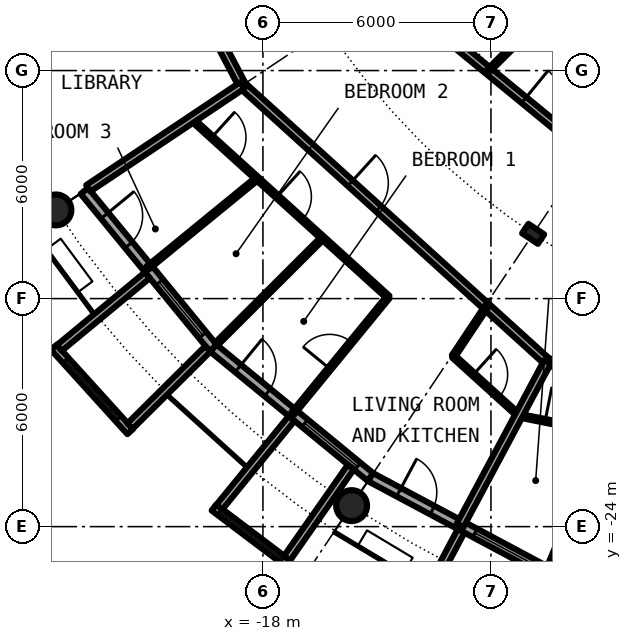
"""IFC4 building model, lengths in metres.
Left out: names, types, materials, properties, quantities, classifications, styles, units other than length and angle.
Written with IfcOpenShell. Run it as: python <this file> out.ifc"""

import sys

from ifc_helpers import new_model, si_unit, direction, frame, frame_2d, origin, origin_2d, place, context, subcontext, project, spatial, rectangle, circle, hollow_circle, i_section, extrude, element, fill, save


model = new_model("IFC4")
c1 = context("Model", 3, precision=1e-05, world=origin(), true_north=direction((0.0, 1.0)))
c2 = subcontext(c1, "Body", "Model", "MODEL_VIEW")
j1 = project(units=[si_unit("LENGTHUNIT", "METRE"), si_unit("PLANEANGLEUNIT", "RADIAN")], contexts=[c1])
p1 = place(None, origin())
s1 = spatial("IfcSite", under=j1, at=p1, CompositionType="ELEMENT")
p2 = place(p1, origin())
s2 = spatial("IfcBuilding", under=s1, at=p2, CompositionType="ELEMENT")
p3 = place(p2, frame((0.0, 0.0, 154.35)))
s3 = spatial("IfcBuildingStorey", under=s2, at=p3, CompositionType="ELEMENT", Elevation=154.35)
for number, where, z_axis, x_axis in (
    (1, (-23.448, -15.667, 0.0), (0.0, 0.0, 1.0), (1.0, 0.0, 0.0)),
    (2, (-15.667, -23.448, 0.0), (0.0, 0.0, 1.0), (1.0, 0.0, 0.0)),
):
    element("IfcColumn", number, at=place(p3, frame(where, z_axis=z_axis, x_axis=x_axis)), inside=s3, PredefinedType="COLUMN", context=c2, shape_type="SweptSolid", body=[
        extrude(hollow_circle(Radius=0.406, WallThickness=0.04, at=origin_2d()), origin(), (0.0, 0.0, 1.0), 3.05),
    ])
p4 = place(p3, frame((-10.889, -16.297, 0.0), z_axis=(0.0, 0.0, 1.0), x_axis=(-0.55557023302, -0.831469612303, 0.0)))
e3 = element("IfcColumn", 3, at=p4, inside=s3, PredefinedType="COLUMN", context=c2, shape_type="SweptSolid", body=[
    extrude(i_section(OverallWidth=0.3, OverallDepth=0.5, WebThickness=0.014, FlangeThickness=0.028, FilletRadius=0.027, at=origin_2d()), origin(), (0.0, 0.0, 1.0), 3.05),
])
p5 = place(p3, frame((-22.699, -15.167, 0.0), z_axis=(0.0, 0.0, 1.0), x_axis=(0.634382322723, -0.773019449054, 0.0)))
e4 = element("IfcWall", 4, at=p5, inside=s3, PredefinedType="SOLIDWALL", context=c2, shape_type="SweptSolid", body=[
    extrude(rectangle(XDim=5.352, YDim=0.25, at=frame_2d((2.676, 0.0))), origin(), (0.0, 0.0, 1.0), 2.7),
])
p6 = place(p5, frame((0.841, 0.0, 0.0)))
e5 = element("IfcOpeningElement", 5, at=p6, cuts=e4, PredefinedType="OPENING", context=c2, shape_type="SweptSolid", body=[
    extrude(rectangle(XDim=1.0, YDim=2.2, at=frame_2d((0.5, 1.1))), frame((0.0, 0.135, 0.0), z_axis=(0.0, -1.0, 0.0), x_axis=(1.0, 0.0, 0.0)), (0.0, 0.0, 1.0), 0.27),
])
p7 = place(p5, frame((3.111, 0.0, 0.3)))
e6 = element("IfcOpeningElement", 6, at=p7, cuts=e4, PredefinedType="OPENING", context=c2, shape_type="SweptSolid", body=[
    extrude(rectangle(XDim=1.8, YDim=2.1, at=frame_2d((0.9, 1.05))), frame((0.0, 0.135, 0.0), z_axis=(0.0, -1.0, 0.0), x_axis=(1.0, 0.0, 0.0)), (0.0, 0.0, 1.0), 0.27),
])
p8 = place(p3, frame((-23.503, -19.282, -0.03), z_axis=(0.0, 0.0, 1.0), x_axis=(0.671506829416, -0.740998365753, 0.0)))
e7 = element("IfcWall", 7, at=p8, inside=s3, PredefinedType="SOLIDWALL", context=c2, shape_type="SweptSolid", body=[
    extrude(rectangle(XDim=2.993, YDim=0.2, at=frame_2d((1.497, 0.0))), origin(), (0.0, 0.0, 1.0), 2.73),
])
p9 = place(p8, frame((0.457, 0.0, 0.33)))
e8 = element("IfcOpeningElement", 8, at=p9, cuts=e7, PredefinedType="OPENING", context=c2, shape_type="SweptSolid", body=[
    extrude(circle(Radius=1.04, at=frame_2d((1.04, 1.04))), frame((0.0, 0.11, 0.0), z_axis=(0.0, -1.0, 0.0), x_axis=(1.0, 0.0, 0.0)), (0.0, 0.0, 1.0), 0.22),
])
p10 = place(p3, frame((-21.041, -17.384, -0.03), z_axis=(0.0, 0.0, 1.0), x_axis=(-0.770784861449, -0.63709551667, 0.0)))
e9 = element("IfcWall", 9, at=p10, inside=s3, PredefinedType="SOLIDWALL", context=c2, shape_type="SweptSolid", body=[
    extrude(rectangle(XDim=3.006, YDim=0.2, at=frame_2d((1.503, 0.0))), origin(), (0.0, 0.0, 1.0), 2.73),
])
p11 = place(p3, frame((-19.45, -19.323, -0.03), z_axis=(0.0, 0.0, 1.0), x_axis=(-0.709727076896, -0.704476739375, 0.0)))
e10 = element("IfcWall", 10, at=p11, inside=s3, PredefinedType="SOLIDWALL", context=c2, shape_type="SweptSolid", body=[
    extrude(rectangle(XDim=2.883, YDim=0.2, at=frame_2d((1.441, 0.0))), origin(), (0.0, 0.0, 1.0), 2.73),
])
p12 = place(p3, frame((-19.304, -19.304, 0.0), z_axis=(0.0, 0.0, 1.0), x_axis=(0.773019449054, -0.634382322723, 0.0)))
e11 = element("IfcWall", 11, at=p12, inside=s3, PredefinedType="SOLIDWALL", context=c2, shape_type="SweptSolid", body=[
    extrude(rectangle(XDim=5.352, YDim=0.25, at=frame_2d((2.676, 0.0))), origin(), (0.0, 0.0, 1.0), 2.7),
])
p13 = place(p12, frame((0.841, 0.0, 0.0)))
e12 = element("IfcOpeningElement", 12, at=p13, cuts=e11, PredefinedType="OPENING", context=c2, shape_type="SweptSolid", body=[
    extrude(rectangle(XDim=1.0, YDim=2.2, at=frame_2d((0.5, 1.1))), frame((0.0, 0.135, 0.0), z_axis=(0.0, -1.0, 0.0), x_axis=(1.0, 0.0, 0.0)), (0.0, 0.0, 1.0), 0.27),
])
p14 = place(p12, frame((3.111, 0.0, 0.3)))
e13 = element("IfcOpeningElement", 13, at=p14, cuts=e11, PredefinedType="OPENING", context=c2, shape_type="SweptSolid", body=[
    extrude(rectangle(XDim=1.8, YDim=2.1, at=frame_2d((0.9, 1.05))), frame((0.0, 0.135, 0.0), z_axis=(0.0, -1.0, 0.0), x_axis=(1.0, 0.0, 0.0)), (0.0, 0.0, 1.0), 0.27),
])
p15 = place(p3, frame((-19.289, -23.497, -0.03), z_axis=(0.0, 0.0, 1.0), x_axis=(0.797887588059, -0.602806268067, 0.0)))
e14 = element("IfcWall", 14, at=p15, inside=s3, PredefinedType="SOLIDWALL", context=c2, shape_type="SweptSolid", body=[
    extrude(rectangle(XDim=2.447, YDim=0.2, at=frame_2d((1.223, 0.0))), origin(), (0.0, 0.0, 1.0), 2.73),
])
p16 = place(p15, frame((0.183, 0.0, 0.33)))
e15 = element("IfcOpeningElement", 15, at=p16, cuts=e14, PredefinedType="OPENING", context=c2, shape_type="SweptSolid", body=[
    extrude(circle(Radius=1.04, at=frame_2d((1.04, 1.04))), frame((0.0, 0.11, 0.0), z_axis=(0.0, -1.0, 0.0), x_axis=(1.0, 0.0, 0.0)), (0.0, 0.0, 1.0), 0.22),
])
p17 = place(p3, frame((-17.246, -21.155, -0.03), z_axis=(0.0, 0.0, 1.0), x_axis=(-0.631741648902, -0.775179004516, 0.0)))
e16 = element("IfcWall", 16, at=p17, inside=s3, PredefinedType="SOLIDWALL", context=c2, shape_type="SweptSolid", body=[
    extrude(rectangle(XDim=3.006, YDim=0.2, at=frame_2d((1.503, 0.0))), origin(), (0.0, 0.0, 1.0), 2.73),
])
p18 = place(p3, frame((-15.688, -22.433, -0.03), z_axis=(0.0, 0.0, 1.0), x_axis=(-0.573260687834, -0.819373043115, 0.0)))
e17 = element("IfcWall", 17, at=p18, inside=s3, PredefinedType="SOLIDWALL", context=c2, shape_type="SweptSolid", body=[
    extrude(rectangle(XDim=2.925, YDim=0.2, at=frame_2d((1.463, 0.0))), origin(), (0.0, 0.0, 1.0), 2.73),
])
p19 = place(p3, frame((-15.167, -22.699, 0.0), z_axis=(0.0, 0.0, 1.0), x_axis=(0.881915646801, -0.471407246368, 0.0)))
e18 = element("IfcWall", 18, at=p19, inside=s3, PredefinedType="SOLIDWALL", context=c2, shape_type="SweptSolid", body=[
    extrude(rectangle(XDim=5.352, YDim=0.25, at=frame_2d((2.676, 0.0))), origin(), (0.0, 0.0, 1.0), 2.7),
])
p20 = place(p19, frame((0.841, 0.0, 0.0)))
e19 = element("IfcOpeningElement", 19, at=p20, cuts=e18, PredefinedType="OPENING", context=c2, shape_type="SweptSolid", body=[
    extrude(rectangle(XDim=1.0, YDim=2.2, at=frame_2d((0.5, 1.1))), frame((0.0, 0.135, 0.0), z_axis=(0.0, -1.0, 0.0), x_axis=(1.0, 0.0, 0.0)), (0.0, 0.0, 1.0), 0.27),
])
p21 = place(p19, frame((3.111, 0.0, 0.3)))
e20 = element("IfcOpeningElement", 20, at=p21, cuts=e18, PredefinedType="OPENING", context=c2, shape_type="SweptSolid", body=[
    extrude(rectangle(XDim=1.8, YDim=2.1, at=frame_2d((0.9, 1.05))), frame((0.0, 0.135, 0.0), z_axis=(0.0, -1.0, 0.0), x_axis=(1.0, 0.0, 0.0)), (0.0, 0.0, 1.0), 0.27),
])
p22 = place(p3, frame((-12.787, -24.113, -0.03), z_axis=(0.0, 0.0, 1.0), x_axis=(-0.468365282436, -0.883534924159, 0.0)))
e21 = element("IfcWall", 21, at=p22, inside=s3, PredefinedType="SOLIDWALL", context=c2, shape_type="SweptSolid", body=[
    extrude(rectangle(XDim=3.006, YDim=0.2, at=frame_2d((1.503, 0.0))), origin(), (0.0, 0.0, 1.0), 2.73),
])
p23 = place(p3, frame((-19.869, -13.284, 0.0), z_axis=(0.0, 0.0, 1.0), x_axis=(0.741104058203, -0.67139018083, 0.0)))
e22 = element("IfcWall", 22, at=p23, inside=s3, PredefinedType="PARTITIONING", context=c2, shape_type="SweptSolid", body=[
    extrude(rectangle(XDim=6.969, YDim=0.1, at=frame_2d((3.484, 0.0))), origin(), (0.0, 0.0, 1.0), 2.7),
])
p24 = place(p23, frame((3.028, 0.0, 0.0)))
e23 = element("IfcOpeningElement", 23, at=p24, cuts=e22, PredefinedType="OPENING", context=c2, shape_type="SweptSolid", body=[
    extrude(rectangle(XDim=0.9, YDim=2.3, at=frame_2d((0.45, 1.15))), frame((0.0, 0.06, 0.0), z_axis=(0.0, -1.0, 0.0), x_axis=(1.0, 0.0, 0.0)), (0.0, 0.0, 1.0), 0.12),
])
p25 = place(p23, frame((0.705, 0.0, 0.0)))
e24 = element("IfcOpeningElement", 24, at=p25, cuts=e22, PredefinedType="OPENING", context=c2, shape_type="SweptSolid", body=[
    extrude(rectangle(XDim=0.9, YDim=2.3, at=frame_2d((0.45, 1.15))), frame((0.0, 0.06, 0.0), z_axis=(0.0, -1.0, 0.0), x_axis=(1.0, 0.0, 0.0)), (0.0, 0.0, 1.0), 0.12),
])
p26 = place(p3, frame((-12.988, -19.518, 0.0), z_axis=(0.0, 0.0, 1.0), x_axis=(0.741132356378, -0.671358942988, 0.0)))
e25 = element("IfcWall", 25, at=p26, inside=s3, PredefinedType="PARTITIONING", context=c2, shape_type="SweptSolid", body=[
    extrude(rectangle(XDim=2.323, YDim=0.1, at=frame_2d((1.162, 0.0))), origin(), (0.0, 0.0, 1.0), 2.7),
])
p27 = place(p26, frame((0.712, 0.0, 0.0)))
e26 = element("IfcOpeningElement", 26, at=p27, cuts=e25, PredefinedType="OPENING", context=c2, shape_type="SweptSolid", body=[
    extrude(rectangle(XDim=0.9, YDim=2.3, at=frame_2d((0.45, 1.15))), frame((0.0, 0.06, 0.0), z_axis=(0.0, -1.0, 0.0), x_axis=(1.0, 0.0, 0.0)), (0.0, 0.0, 1.0), 0.12),
])
p28 = place(p3, frame((-11.264, -21.08, 0.0), z_axis=(0.0, 0.0, 1.0), x_axis=(0.980795304313, -0.195039921651, 0.0)))
e27 = element("IfcWall", 27, at=p28, inside=s3, PredefinedType="PARTITIONING", context=c2, shape_type="SweptSolid", body=[
    extrude(rectangle(XDim=6.937, YDim=0.1, at=frame_2d((3.469, 0.0))), origin(), (0.0, 0.0, 1.0), 2.7),
])
p29 = place(p28, frame((3.016, 0.0, 0.0)))
e28 = element("IfcOpeningElement", 28, at=p29, cuts=e27, PredefinedType="OPENING", context=c2, shape_type="SweptSolid", body=[
    extrude(rectangle(XDim=0.9, YDim=2.3, at=frame_2d((0.45, 1.15))), frame((0.0, 0.06, 0.0), z_axis=(0.0, -1.0, 0.0), x_axis=(1.0, 0.0, 0.0)), (0.0, 0.0, 1.0), 0.12),
])
p30 = place(p28, frame((0.704, 0.0, 0.0)))
e29 = element("IfcOpeningElement", 29, at=p30, cuts=e27, PredefinedType="OPENING", context=c2, shape_type="SweptSolid", body=[
    extrude(rectangle(XDim=0.9, YDim=2.3, at=frame_2d((0.45, 1.15))), frame((0.0, 0.06, 0.0), z_axis=(0.0, -1.0, 0.0), x_axis=(1.0, 0.0, 0.0)), (0.0, 0.0, 1.0), 0.12),
])
p31 = place(p3, frame((-19.307, -10.935, 0.0), z_axis=(0.0, 0.0, 1.0), x_axis=(0.465605550524, -0.884992356646, 0.0)))
e30 = element("IfcWall", 30, at=p31, inside=s3, PredefinedType="PARTITIONING", context=c2, shape_type="SweptSolid", body=[
    extrude(rectangle(XDim=1.643, YDim=0.2, at=frame_2d((0.821, 0.0))), origin(), (0.0, 0.0, 1.0), 2.7),
])
p32 = place(p3, frame((-18.542, -12.389, 0.0), z_axis=(0.0, 0.0, 1.0), x_axis=(0.740979597636, -0.671527539188, 0.0)))
e31 = element("IfcWall", 31, at=p32, inside=s3, PredefinedType="PARTITIONING", context=c2, shape_type="SweptSolid", body=[
    extrude(rectangle(XDim=10.841, YDim=0.2, at=frame_2d((5.42, 0.0))), origin(), (0.0, 0.0, 1.0), 2.7),
])
p33 = place(p32, frame((3.835, 0.0, 0.0)))
e32 = element("IfcOpeningElement", 32, at=p33, cuts=e31, PredefinedType="OPENING", context=c2, shape_type="SweptSolid", body=[
    extrude(rectangle(XDim=1.0, YDim=2.3, at=frame_2d((0.5, 1.15))), frame((0.0, 0.11, 0.0), z_axis=(0.0, -1.0, 0.0), x_axis=(1.0, 0.0, 0.0)), (0.0, 0.0, 1.0), 0.22),
])
p34 = place(p3, frame((-10.512, -19.667, 0.0), z_axis=(0.0, 0.0, 1.0), x_axis=(0.980780341017, -0.195115152343, 0.0)))
e33 = element("IfcWall", 33, at=p34, inside=s3, PredefinedType="PARTITIONING", context=c2, shape_type="SweptSolid", body=[
    extrude(rectangle(XDim=12.947, YDim=0.2, at=frame_2d((6.473, 0.0))), origin(), (0.0, 0.0, 1.0), 2.7),
])
p35 = place(p34, frame((4.894, 0.0, 0.0)))
e34 = element("IfcOpeningElement", 34, at=p35, cuts=e33, PredefinedType="OPENING", context=c2, shape_type="SweptSolid", body=[
    extrude(rectangle(XDim=1.0, YDim=2.3, at=frame_2d((0.5, 1.15))), frame((0.0, 0.11, 0.0), z_axis=(0.0, -1.0, 0.0), x_axis=(1.0, 0.0, 0.0)), (0.0, 0.0, 1.0), 0.22),
])
p36 = place(p3, frame((-14.717, -9.834, 0.0), z_axis=(0.0, 0.0, 1.0), x_axis=(0.773034536097, -0.634363938131, 0.0)))
e35 = element("IfcWall", 35, at=p36, inside=s3, PredefinedType="PARTITIONING", context=c2, shape_type="SweptSolid", body=[
    extrude(rectangle(XDim=10.277, YDim=0.2, at=frame_2d((5.138, 0.0))), origin(), (0.0, 0.0, 1.0), 2.7),
])
p37 = place(p36, frame((4.638, 0.0, 0.0)))
e36 = element("IfcOpeningElement", 36, at=p37, cuts=e35, PredefinedType="OPENING", context=c2, shape_type="SweptSolid", body=[
    extrude(rectangle(XDim=1.0, YDim=2.3, at=frame_2d((0.5, 1.15))), frame((0.0, 0.11, 0.0), z_axis=(0.0, -1.0, 0.0), x_axis=(1.0, 0.0, 0.0)), (0.0, 0.0, 1.0), 0.22),
])
p38 = place(p3, frame((-22.595, -15.098, 0.0), z_axis=(0.0, 0.0, 1.0), x_axis=(0.831387096605, 0.55569370664, 0.0)))
e37 = element("IfcWall", 37, at=p38, inside=s3, PredefinedType="PARTITIONING", context=c2, shape_type="SweptSolid", body=[
    extrude(rectangle(XDim=4.875, YDim=0.2, at=frame_2d((2.438, 0.0))), origin(), (0.0, 0.0, 1.0), 2.7),
])
p39 = place(p3, frame((-21.04, -17.199, 0.0), z_axis=(0.0, 0.0, 1.0), x_axis=(0.774321581607, 0.63279229472, 0.0)))
e38 = element("IfcWall", 38, at=p39, inside=s3, PredefinedType="PARTITIONING", context=c2, shape_type="SweptSolid", body=[
    extrude(rectangle(XDim=3.731, YDim=0.1, at=frame_2d((1.866, 0.0))), origin(), (0.0, 0.0, 1.0), 2.7),
])
p40 = place(p3, frame((-19.231, -19.2, 0.0), z_axis=(0.0, 0.0, 1.0), x_axis=(0.707722727509, 0.706490297858, 0.0)))
e39 = element("IfcWall", 39, at=p40, inside=s3, PredefinedType="PARTITIONING", context=c2, shape_type="SweptSolid", body=[
    extrude(rectangle(XDim=3.962, YDim=0.1, at=frame_2d((1.981, 0.0))), origin(), (0.0, 0.0, 1.0), 2.7),
])
p41 = place(p3, frame((-17.216, -21.026, 0.0), z_axis=(0.0, 0.0, 1.0), x_axis=(0.633590098448, 0.773668913133, 0.0)))
e40 = element("IfcWall", 40, at=p41, inside=s3, PredefinedType="PARTITIONING", context=c2, shape_type="SweptSolid", body=[
    extrude(rectangle(XDim=3.962, YDim=0.1, at=frame_2d((1.981, 0.0))), origin(), (0.0, 0.0, 1.0), 2.7),
])
p42 = place(p41, frame((1.531, 0.0, 0.0)))
e41 = element("IfcOpeningElement", 41, at=p42, cuts=e40, PredefinedType="OPENING", context=c2, shape_type="SweptSolid", body=[
    extrude(rectangle(XDim=0.9, YDim=2.3, at=frame_2d((0.45, 1.15))), frame((0.0, 0.06, 0.0), z_axis=(0.0, -1.0, 0.0), x_axis=(1.0, 0.0, 0.0)), (0.0, 0.0, 1.0), 0.12),
])
p43 = place(p3, frame((-12.988, -19.518, 0.0), z_axis=(0.0, 0.0, 1.0), x_axis=(0.554125989098, 0.832432813028, 0.0)))
e42 = element("IfcWall", 42, at=p43, inside=s3, PredefinedType="PARTITIONING", context=c2, shape_type="SweptSolid", body=[
    extrude(rectangle(XDim=1.57, YDim=0.1, at=frame_2d((0.785, 0.0))), origin(), (0.0, 0.0, 1.0), 2.7),
])
p44 = place(p3, frame((-12.81, -23.966, 0.0), z_axis=(0.0, 0.0, 1.0), x_axis=(0.471427642527, 0.881904744211, 0.0)))
e43 = element("IfcWall", 43, at=p44, inside=s3, PredefinedType="PARTITIONING", context=c2, shape_type="SweptSolid", body=[
    extrude(rectangle(XDim=4.875, YDim=0.2, at=frame_2d((2.438, 0.0))), origin(), (0.0, 0.0, 1.0), 2.7),
])
p45 = place(p3, frame((-12.069, -12.007, 0.0), z_axis=(0.0, 0.0, 1.0), x_axis=(0.708822693149, 0.705386695138, 0.0)))
e44 = element("IfcWall", 44, at=p45, inside=s3, PredefinedType="PARTITIONING", context=c2, shape_type="SweptSolid", body=[
    extrude(rectangle(XDim=4.121, YDim=0.1, at=frame_2d((2.061, 0.0))), origin(), (0.0, 0.0, 1.0), 2.7),
])
p46 = place(p45, frame((1.611, 0.0, 0.0)))
e45 = element("IfcOpeningElement", 45, at=p46, cuts=e44, PredefinedType="OPENING", context=c2, shape_type="SweptSolid", body=[
    extrude(rectangle(XDim=0.9, YDim=2.3, at=frame_2d((0.45, 1.15))), frame((0.0, 0.06, 0.0), z_axis=(0.0, -1.0, 0.0), x_axis=(1.0, 0.0, 0.0)), (0.0, 0.0, 1.0), 0.12),
])
p47 = place(p3, frame((-10.479, -25.073, 0.0), z_axis=(0.0, 0.0, 1.0), x_axis=(0.385572005139, 0.922677749192, 0.0)))
e46 = element("IfcWall", 46, at=p47, inside=s3, PredefinedType="PARTITIONING", context=c2, shape_type="SweptSolid", body=[
    extrude(rectangle(XDim=3.841, YDim=0.1, at=frame_2d((1.92, 0.0))), origin(), (0.0, 0.0, 1.0), 2.7),
])
p48 = place(p6, origin())
e47 = element("IfcDoor", 47, at=p48, inside=s3, OperationType="SINGLE_SWING_LEFT", PredefinedType="DOOR", context=c2, shape_type="SweptSolid", body=[
    extrude(rectangle(XDim=1.0, YDim=2.2, at=frame_2d((0.5, 1.1))), frame((0.0, 0.025, 0.0), z_axis=(0.0, -1.0, 0.0), x_axis=(1.0, 0.0, 0.0)), (0.0, 0.0, 1.0), 0.05),
])
fill(e5, e47)
p49 = place(p7, origin())
e48 = element("IfcWindow", 48, at=p49, inside=s3, PartitioningType="SINGLE_PANEL", PredefinedType="WINDOW", context=c2, shape_type="SweptSolid", body=[
    extrude(rectangle(XDim=1.8, YDim=2.1, at=frame_2d((0.9, 1.05))), frame((0.0, 0.03, 0.0), z_axis=(0.0, -1.0, 0.0), x_axis=(1.0, 0.0, 0.0)), (0.0, 0.0, 1.0), 0.06),
])
fill(e6, e48)
p50 = place(p9, origin())
e49 = element("IfcWindow", 49, at=p50, inside=s3, PartitioningType="SINGLE_PANEL", PredefinedType="WINDOW", context=c2, shape_type="SweptSolid", body=[
    extrude(circle(Radius=1.04, at=frame_2d((1.04, 1.04))), frame((0.0, 0.03, 0.0), z_axis=(0.0, -1.0, 0.0), x_axis=(1.0, 0.0, 0.0)), (0.0, 0.0, 1.0), 0.06),
])
fill(e8, e49)
p51 = place(p13, origin())
e50 = element("IfcDoor", 50, at=p51, inside=s3, OperationType="SINGLE_SWING_LEFT", PredefinedType="DOOR", context=c2, shape_type="SweptSolid", body=[
    extrude(rectangle(XDim=1.0, YDim=2.2, at=frame_2d((0.5, 1.1))), frame((0.0, 0.025, 0.0), z_axis=(0.0, -1.0, 0.0), x_axis=(1.0, 0.0, 0.0)), (0.0, 0.0, 1.0), 0.05),
])
fill(e12, e50)
p52 = place(p14, origin())
e51 = element("IfcWindow", 51, at=p52, inside=s3, PartitioningType="SINGLE_PANEL", PredefinedType="WINDOW", context=c2, shape_type="SweptSolid", body=[
    extrude(rectangle(XDim=1.8, YDim=2.1, at=frame_2d((0.9, 1.05))), frame((0.0, 0.03, 0.0), z_axis=(0.0, -1.0, 0.0), x_axis=(1.0, 0.0, 0.0)), (0.0, 0.0, 1.0), 0.06),
])
fill(e13, e51)
p53 = place(p16, origin())
e52 = element("IfcWindow", 52, at=p53, inside=s3, PartitioningType="SINGLE_PANEL", PredefinedType="WINDOW", context=c2, shape_type="SweptSolid", body=[
    extrude(circle(Radius=1.04, at=frame_2d((1.04, 1.04))), frame((0.0, 0.03, 0.0), z_axis=(0.0, -1.0, 0.0), x_axis=(1.0, 0.0, 0.0)), (0.0, 0.0, 1.0), 0.06),
])
fill(e15, e52)
p54 = place(p20, origin())
e53 = element("IfcDoor", 53, at=p54, inside=s3, OperationType="SINGLE_SWING_LEFT", PredefinedType="DOOR", context=c2, shape_type="SweptSolid", body=[
    extrude(rectangle(XDim=1.0, YDim=2.2, at=frame_2d((0.5, 1.1))), frame((0.0, 0.025, 0.0), z_axis=(0.0, -1.0, 0.0), x_axis=(1.0, 0.0, 0.0)), (0.0, 0.0, 1.0), 0.05),
])
fill(e19, e53)
p55 = place(p21, origin())
e54 = element("IfcWindow", 54, at=p55, inside=s3, PartitioningType="SINGLE_PANEL", PredefinedType="WINDOW", context=c2, shape_type="SweptSolid", body=[
    extrude(rectangle(XDim=1.8, YDim=2.1, at=frame_2d((0.9, 1.05))), frame((0.0, 0.03, 0.0), z_axis=(0.0, -1.0, 0.0), x_axis=(1.0, 0.0, 0.0)), (0.0, 0.0, 1.0), 0.06),
])
fill(e20, e54)
p56 = place(p33, origin())
e55 = element("IfcDoor", 55, at=p56, inside=s3, OperationType="SINGLE_SWING_LEFT", PredefinedType="DOOR", context=c2, shape_type="SweptSolid", body=[
    extrude(rectangle(XDim=1.0, YDim=2.3, at=frame_2d((0.5, 1.15))), frame((0.0, 0.025, 0.0), z_axis=(0.0, -1.0, 0.0), x_axis=(1.0, 0.0, 0.0)), (0.0, 0.0, 1.0), 0.05),
])
fill(e32, e55)
p57 = place(p27, origin())
e56 = element("IfcDoor", 56, at=p57, inside=s3, OperationType="SINGLE_SWING_RIGHT", PredefinedType="DOOR", context=c2, shape_type="SweptSolid", body=[
    extrude(rectangle(XDim=0.9, YDim=2.3, at=frame_2d((0.45, 1.15))), frame((0.0, 0.025, 0.0), z_axis=(0.0, -1.0, 0.0), x_axis=(1.0, 0.0, 0.0)), (0.0, 0.0, 1.0), 0.05),
])
fill(e26, e56)
p58 = place(p42, origin())
e57 = element("IfcDoor", 57, at=p58, inside=s3, OperationType="SINGLE_SWING_RIGHT", PredefinedType="DOOR", context=c2, shape_type="SweptSolid", body=[
    extrude(rectangle(XDim=0.9, YDim=2.3, at=frame_2d((0.45, 1.15))), frame((0.0, 0.025, 0.0), z_axis=(0.0, -1.0, 0.0), x_axis=(1.0, 0.0, 0.0)), (0.0, 0.0, 1.0), 0.05),
])
fill(e41, e57)
p59 = place(p24, origin())
e58 = element("IfcDoor", 58, at=p59, inside=s3, OperationType="SINGLE_SWING_LEFT", PredefinedType="DOOR", context=c2, shape_type="SweptSolid", body=[
    extrude(rectangle(XDim=0.9, YDim=2.3, at=frame_2d((0.45, 1.15))), frame((0.0, 0.025, 0.0), z_axis=(0.0, -1.0, 0.0), x_axis=(1.0, 0.0, 0.0)), (0.0, 0.0, 1.0), 0.05),
])
fill(e23, e58)
p60 = place(p25, origin())
e59 = element("IfcDoor", 59, at=p60, inside=s3, OperationType="SINGLE_SWING_LEFT", PredefinedType="DOOR", context=c2, shape_type="SweptSolid", body=[
    extrude(rectangle(XDim=0.9, YDim=2.3, at=frame_2d((0.45, 1.15))), frame((0.0, 0.025, 0.0), z_axis=(0.0, -1.0, 0.0), x_axis=(1.0, 0.0, 0.0)), (0.0, 0.0, 1.0), 0.05),
])
fill(e24, e59)
p61 = place(p30, origin())
e60 = element("IfcDoor", 60, at=p61, inside=s3, OperationType="SINGLE_SWING_LEFT", PredefinedType="DOOR", context=c2, shape_type="SweptSolid", body=[
    extrude(rectangle(XDim=0.9, YDim=2.3, at=frame_2d((0.45, 1.15))), frame((0.0, 0.025, 0.0), z_axis=(0.0, -1.0, 0.0), x_axis=(1.0, 0.0, 0.0)), (0.0, 0.0, 1.0), 0.05),
])
fill(e29, e60)
p62 = place(p37, origin())
e61 = element("IfcDoor", 61, at=p62, inside=s3, OperationType="SINGLE_SWING_LEFT", PredefinedType="DOOR", context=c2, shape_type="SweptSolid", body=[
    extrude(rectangle(XDim=1.0, YDim=2.3, at=frame_2d((0.5, 1.15))), frame((0.0, 0.025, 0.0), z_axis=(0.0, -1.0, 0.0), x_axis=(1.0, 0.0, 0.0)), (0.0, 0.0, 1.0), 0.05),
])
fill(e36, e61)
save(model, sys.argv[1])
